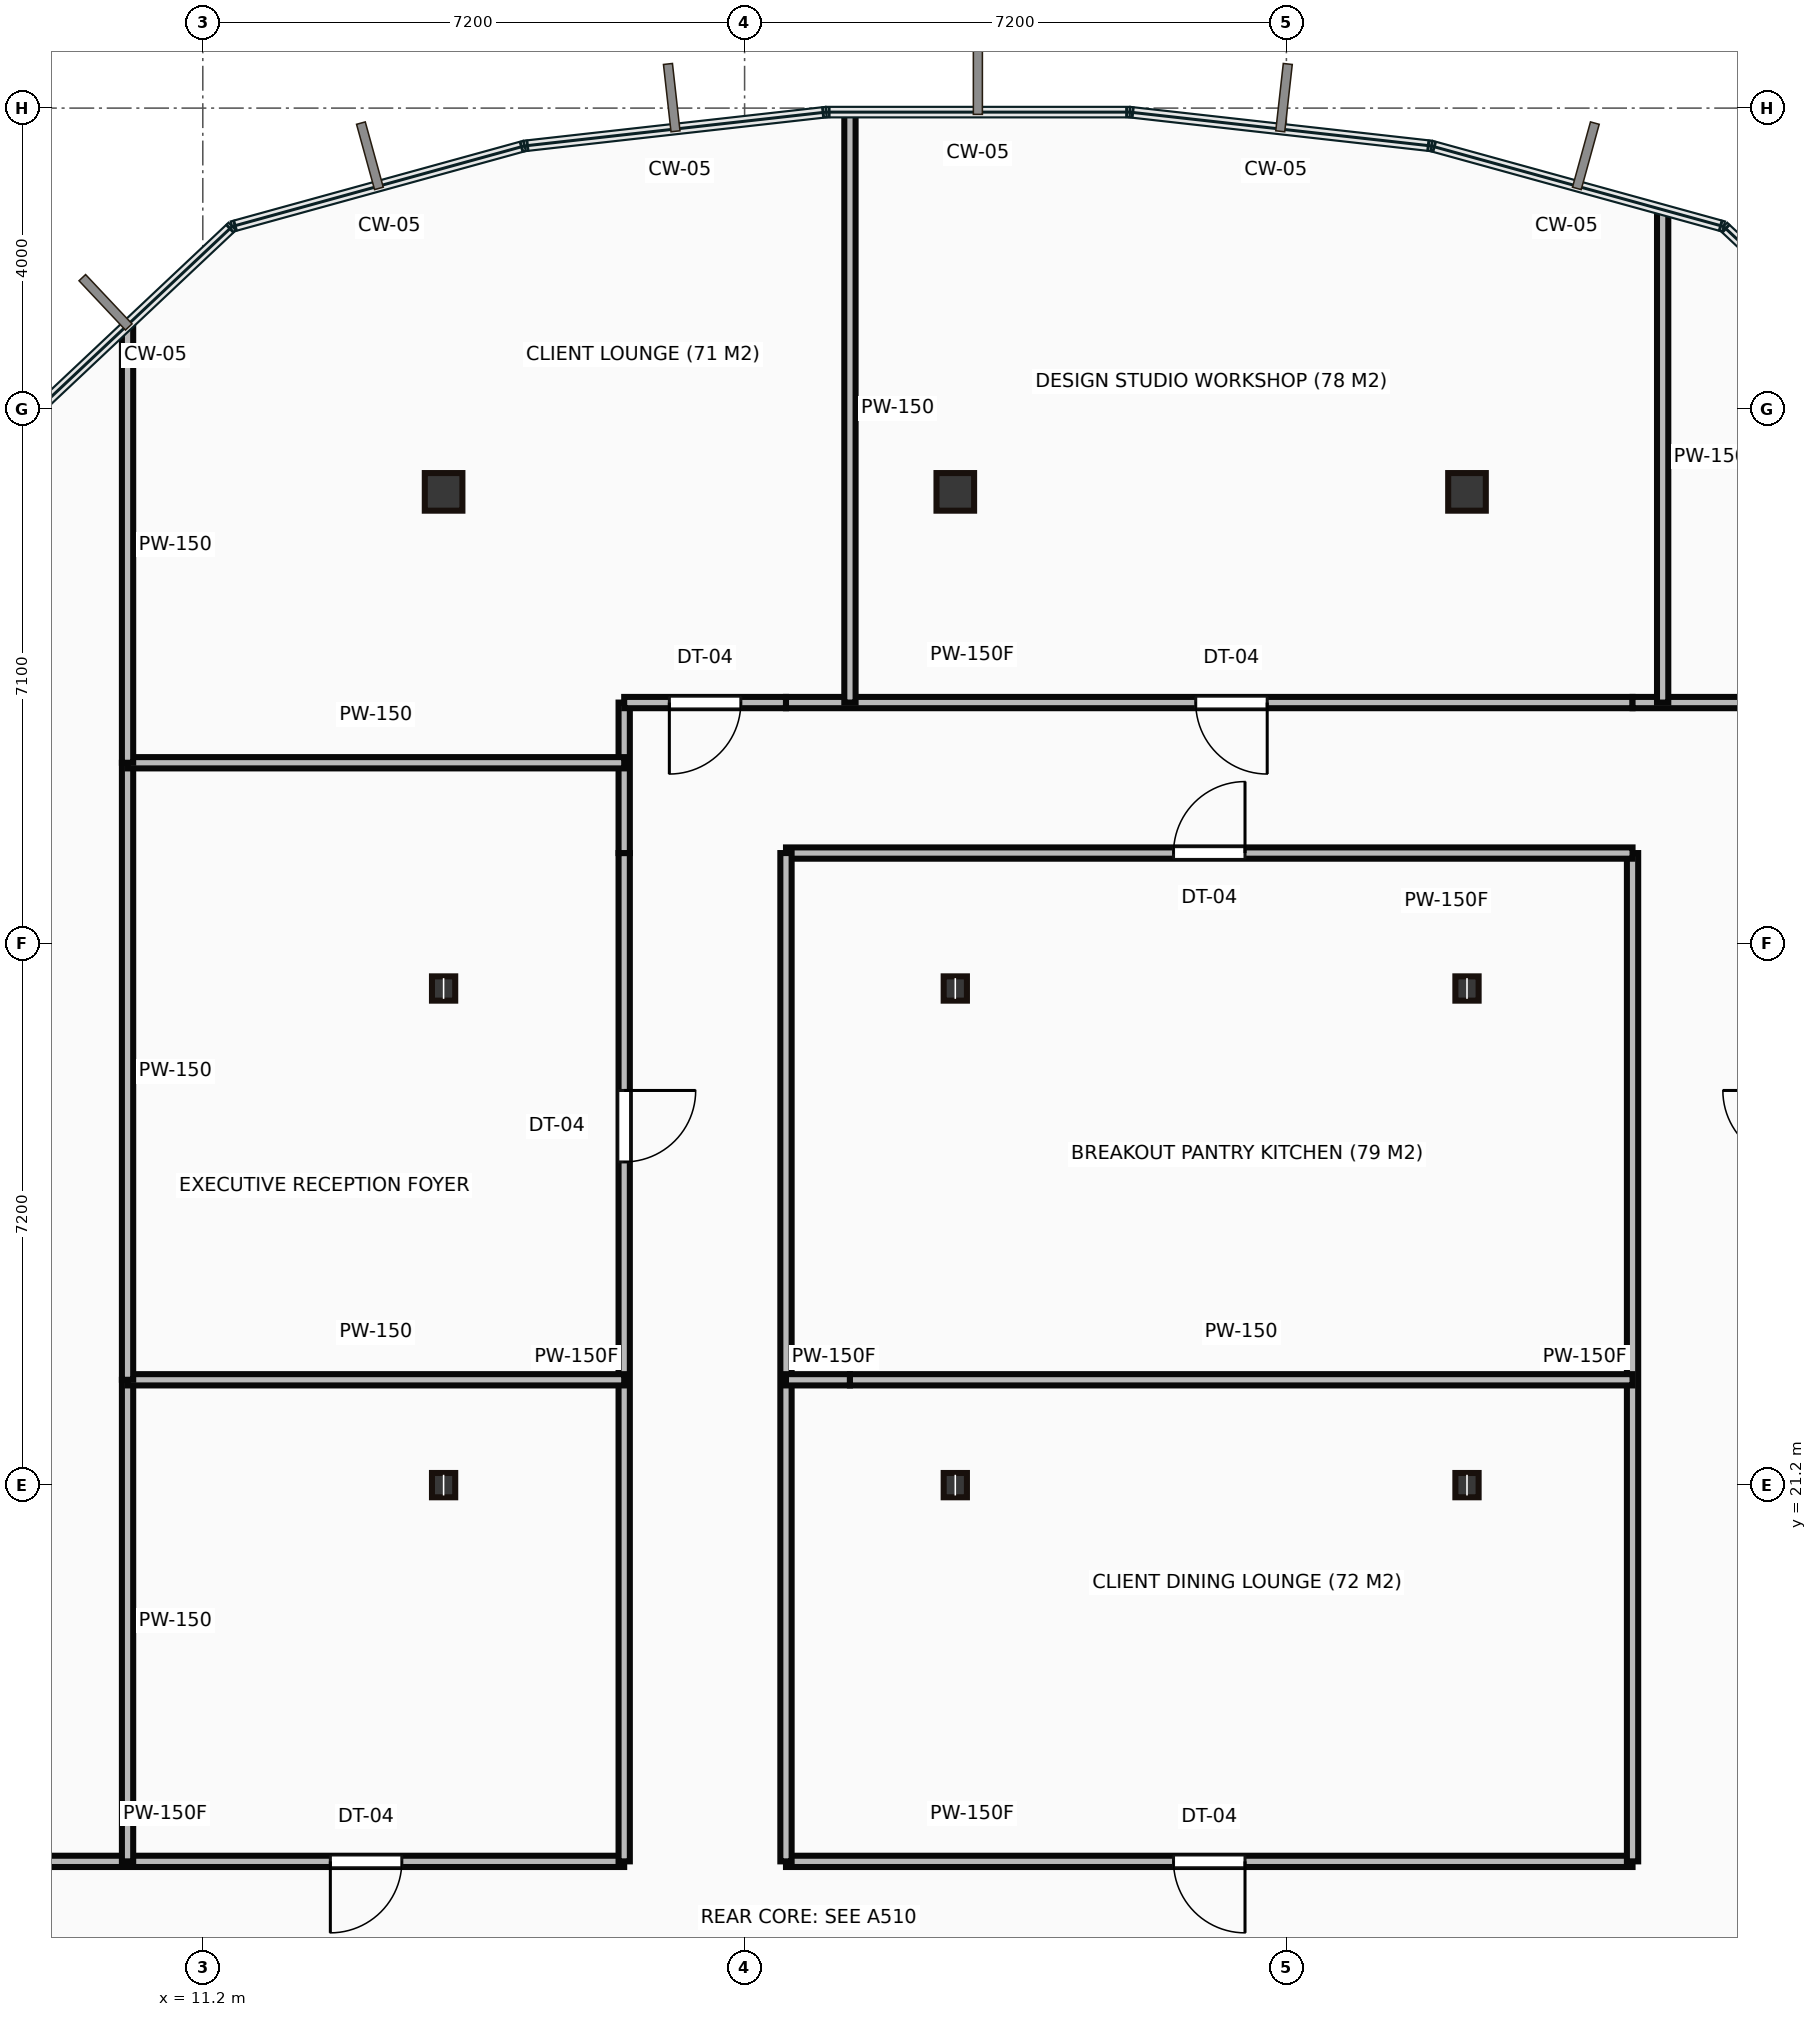
"""IFC4 building model, lengths in metres.
Left out: names, types, materials, properties, quantities, classifications, styles, units other than length and angle.
Written with IfcOpenShell. Run it as: python <this file> out.ifc"""

import sys

from ifc_helpers import new_model, si_unit, direction, frame, frame_2d, origin, origin_2d, place, context, subcontext, project, spatial, rectangle, hollow_rectangle, i_section, extrude, source, transform, mapped, element, fill, save


model = new_model("IFC4")
c1 = context("Model", 3, precision=1e-05, world=origin(), true_north=direction((0.0, 1.0)))
c2 = subcontext(c1, "Body", "Model", "MODEL_VIEW")
j1 = project(units=[si_unit("LENGTHUNIT", "METRE"), si_unit("PLANEANGLEUNIT", "RADIAN")], contexts=[c1])
p1 = place(None, origin())
s1 = spatial("IfcSite", under=j1, at=p1, CompositionType="ELEMENT")
p2 = place(p1, origin())
s2 = spatial("IfcBuilding", under=s1, at=p2, CompositionType="ELEMENT")
p3 = place(p2, frame((0.0, 0.0, 247.85)))
s3 = spatial("IfcBuildingStorey", under=s2, at=p3, CompositionType="ELEMENT", Elevation=247.85)
m1 = source(origin(), c2, "Body", "SweptSolid", [
    extrude(i_section(OverallWidth=0.309, OverallDepth=0.323, WebThickness=0.014, FlangeThickness=0.023, at=origin_2d()), origin(), (0.0, 0.0, 1.0), 3.65),
])
for number, where, z_axis, x_axis in (
    (1, (14.4, 21.2, 0.0), (0.0, 0.0, 1.0), (1.0, 0.0, 0.0)),
    (2, (14.4, 27.8, 0.0), (0.0, 0.0, 1.0), (1.0, 0.0, 0.0)),
):
    element("IfcColumn", number, at=place(p3, frame(where, z_axis=z_axis, x_axis=x_axis)), inside=s3, PredefinedType="COLUMN", context=c2, shape_type="MappedRepresentation", body=[
        mapped(m1, transform((0.0, 0.0, 0.0))),
    ])
m2 = source(origin(), c2, "Body", "SweptSolid", [
    extrude(hollow_rectangle(XDim=0.5, YDim=0.5, WallThickness=0.022, at=origin_2d()), origin(), (0.0, 0.0, 1.0), 3.65),
])
p4 = place(p3, frame((14.4, 34.4, 0.0), z_axis=(0.0, 0.0, 1.0), x_axis=(1.0, 0.0, 0.0)))
e3 = element("IfcColumn", 3, at=p4, inside=s3, PredefinedType="COLUMN", context=c2, shape_type="MappedRepresentation", body=[
    mapped(m2, transform((0.0, 0.0, 0.0))),
])
for number, where, z_axis, x_axis in (
    (4, (21.2, 21.2, 0.0), (0.0, 0.0, 1.0), (1.0, 0.0, 0.0)),
    (5, (21.2, 27.8, 0.0), (0.0, 0.0, 1.0), (1.0, 0.0, 0.0)),
):
    element("IfcColumn", number, at=place(p3, frame(where, z_axis=z_axis, x_axis=x_axis)), inside=s3, PredefinedType="COLUMN", context=c2, shape_type="MappedRepresentation", body=[
        mapped(m1, transform((0.0, 0.0, 0.0))),
    ])
p5 = place(p3, frame((21.2, 34.4, 0.0), z_axis=(0.0, 0.0, 1.0), x_axis=(1.0, 0.0, 0.0)))
e6 = element("IfcColumn", 6, at=p5, inside=s3, PredefinedType="COLUMN", context=c2, shape_type="MappedRepresentation", body=[
    mapped(m2, transform((0.0, 0.0, 0.0))),
])
for number, where, z_axis, x_axis in (
    (7, (28.0, 21.2, 0.0), (0.0, 0.0, 1.0), (1.0, 0.0, 0.0)),
    (8, (28.0, 27.8, 0.0), (0.0, 0.0, 1.0), (1.0, 0.0, 0.0)),
):
    element("IfcColumn", number, at=place(p3, frame(where, z_axis=z_axis, x_axis=x_axis)), inside=s3, PredefinedType="COLUMN", context=c2, shape_type="MappedRepresentation", body=[
        mapped(m1, transform((0.0, 0.0, 0.0))),
    ])
p6 = place(p3, frame((28.0, 34.4, 0.0), z_axis=(0.0, 0.0, 1.0), x_axis=(1.0, 0.0, 0.0)))
e9 = element("IfcColumn", 9, at=p6, inside=s3, PredefinedType="COLUMN", context=c2, shape_type="MappedRepresentation", body=[
    mapped(m2, transform((0.0, 0.0, 0.0))),
])
m3 = source(origin(), c2, "Body", "SweptSolid", [
    extrude(rectangle(XDim=12.2, YDim=0.15, at=frame_2d((6.1, 0.0))), origin(), (0.0, 0.0, 1.0), 3.4),
])
p7 = place(p3, frame((4.6, 16.2, 0.0), z_axis=(0.0, 0.0, 1.0), x_axis=(1.0, 0.0, 0.0)))
e10 = element("IfcWall", 10, at=p7, inside=s3, PredefinedType="PARTITIONING", context=c2, shape_type="MappedRepresentation", body=[
    mapped(m3, transform((0.0, 0.0, 0.0))),
])
p8 = place(p7, frame((2.455, 0.0, 0.0)))
e11 = element("IfcOpeningElement", 11, at=p8, cuts=e10, PredefinedType="OPENING", context=c2, shape_type="SweptSolid", body=[
    extrude(rectangle(XDim=0.95, YDim=2.15, at=frame_2d((0.475, 1.075))), frame((0.0, 0.085, 0.0), z_axis=(0.0, -1.0, 0.0), x_axis=(1.0, 0.0, 0.0)), (0.0, 0.0, 1.0), 0.17),
])
p9 = place(p7, frame((8.295, 0.0, 0.0)))
e12 = element("IfcOpeningElement", 12, at=p9, cuts=e10, PredefinedType="OPENING", context=c2, shape_type="SweptSolid", body=[
    extrude(rectangle(XDim=0.95, YDim=2.15, at=frame_2d((0.475, 1.075))), frame((0.0, 0.085, 0.0), z_axis=(0.0, -1.0, 0.0), x_axis=(1.0, 0.0, 0.0)), (0.0, 0.0, 1.0), 0.17),
])
m4 = source(origin(), c2, "Body", "SweptSolid", [
    extrude(rectangle(XDim=13.4, YDim=0.15, at=frame_2d((6.7, 0.0))), origin(), (0.0, 0.0, 1.0), 3.4),
])
p10 = place(p3, frame((16.8, 16.2, 0.0), z_axis=(0.0, 0.0, 1.0), x_axis=(0.0, 1.0, 0.0)))
e13 = element("IfcWall", 13, at=p10, inside=s3, PredefinedType="PARTITIONING", context=c2, shape_type="MappedRepresentation", body=[
    mapped(m4, transform((0.0, 0.0, 0.0))),
])
p11 = place(p10, frame((9.295, 0.0, 0.0)))
e14 = element("IfcOpeningElement", 14, at=p11, cuts=e13, PredefinedType="OPENING", context=c2, shape_type="SweptSolid", body=[
    extrude(rectangle(XDim=0.95, YDim=2.15, at=frame_2d((0.475, 1.075))), frame((0.0, 0.085, 0.0), z_axis=(0.0, -1.0, 0.0), x_axis=(1.0, 0.0, 0.0)), (0.0, 0.0, 1.0), 0.17),
])
m5 = source(origin(), c2, "Body", "SweptSolid", [
    extrude(rectangle(XDim=2.0, YDim=0.15, at=frame_2d((1.0, 0.0))), origin(), (0.0, 0.0, 1.0), 3.4),
])
p12 = place(p3, frame((16.8, 29.6, 0.0), z_axis=(0.0, 0.0, 1.0), x_axis=(0.0, 1.0, 0.0)))
e15 = element("IfcWall", 15, at=p12, inside=s3, PredefinedType="PARTITIONING", context=c2, shape_type="MappedRepresentation", body=[
    mapped(m5, transform((0.0, 0.0, 0.0))),
])
m6 = source(origin(), c2, "Body", "SweptSolid", [
    extrude(rectangle(XDim=2.15, YDim=0.15, at=frame_2d((1.075, 0.0))), origin(), (0.0, 0.0, 1.0), 3.4),
])
p13 = place(p3, frame((16.8, 31.6, 0.0), z_axis=(0.0, 0.0, 1.0), x_axis=(1.0, 0.0, 0.0)))
e16 = element("IfcWall", 16, at=p13, inside=s3, PredefinedType="PARTITIONING", context=c2, shape_type="MappedRepresentation", body=[
    mapped(m6, transform((0.0, 0.0, 0.0))),
])
p14 = place(p13, frame((0.6, 0.0, 0.0)))
e17 = element("IfcOpeningElement", 17, at=p14, cuts=e16, PredefinedType="OPENING", context=c2, shape_type="SweptSolid", body=[
    extrude(rectangle(XDim=0.95, YDim=2.15, at=frame_2d((0.475, 1.075))), frame((0.0, 0.085, 0.0), z_axis=(0.0, -1.0, 0.0), x_axis=(1.0, 0.0, 0.0)), (0.0, 0.0, 1.0), 0.17),
])
m7 = source(origin(), c2, "Body", "SweptSolid", [
    extrude(rectangle(XDim=11.25, YDim=0.15, at=frame_2d((5.625, 0.0))), origin(), (0.0, 0.0, 1.0), 3.4),
])
p15 = place(p3, frame((18.95, 31.6, 0.0), z_axis=(0.0, 0.0, 1.0), x_axis=(1.0, 0.0, 0.0)))
e18 = element("IfcWall", 18, at=p15, inside=s3, PredefinedType="PARTITIONING", context=c2, shape_type="MappedRepresentation", body=[
    mapped(m7, transform((0.0, 0.0, 0.0))),
])
p16 = place(p15, frame((5.445, 0.0, 0.0)))
e19 = element("IfcOpeningElement", 19, at=p16, cuts=e18, PredefinedType="OPENING", context=c2, shape_type="SweptSolid", body=[
    extrude(rectangle(XDim=0.95, YDim=2.15, at=frame_2d((0.475, 1.075))), frame((0.0, 0.085, 0.0), z_axis=(0.0, -1.0, 0.0), x_axis=(1.0, 0.0, 0.0)), (0.0, 0.0, 1.0), 0.17),
])
m8 = source(origin(), c2, "Body", "SweptSolid", [
    extrude(rectangle(XDim=2.15, YDim=0.15, at=frame_2d((1.075, 0.0))), origin(), (0.0, 0.0, 1.0), 3.4),
])
p17 = place(p3, frame((30.2, 31.6, 0.0), z_axis=(0.0, 0.0, 1.0), x_axis=(1.0, 0.0, 0.0)))
e20 = element("IfcWall", 20, at=p17, inside=s3, PredefinedType="PARTITIONING", context=c2, shape_type="MappedRepresentation", body=[
    mapped(m8, transform((0.0, 0.0, 0.0))),
])
p18 = place(p3, frame((18.95, 16.2, 0.0), z_axis=(0.0, 0.0, 1.0), x_axis=(1.0, 0.0, 0.0)))
e21 = element("IfcWall", 21, at=p18, inside=s3, PredefinedType="PARTITIONING", context=c2, shape_type="MappedRepresentation", body=[
    mapped(m7, transform((0.0, 0.0, 0.0))),
])
p19 = place(p18, frame((5.15, 0.0, 0.0)))
e22 = element("IfcOpeningElement", 22, at=p19, cuts=e21, PredefinedType="OPENING", context=c2, shape_type="SweptSolid", body=[
    extrude(rectangle(XDim=0.95, YDim=2.15, at=frame_2d((0.475, 1.075))), frame((0.0, 0.085, 0.0), z_axis=(0.0, -1.0, 0.0), x_axis=(1.0, 0.0, 0.0)), (0.0, 0.0, 1.0), 0.17),
])
p20 = place(p3, frame((30.2, 16.2, 0.0), z_axis=(0.0, 0.0, 1.0), x_axis=(0.0, 1.0, 0.0)))
e23 = element("IfcWall", 23, at=p20, inside=s3, PredefinedType="PARTITIONING", context=c2, shape_type="MappedRepresentation", body=[
    mapped(m4, transform((0.0, 0.0, 0.0))),
])
p21 = place(p3, frame((30.2, 29.6, 0.0), z_axis=(0.0, 0.0, 1.0), x_axis=(-1.0, 0.0, 0.0)))
e24 = element("IfcWall", 24, at=p21, inside=s3, PredefinedType="PARTITIONING", context=c2, shape_type="MappedRepresentation", body=[
    mapped(m7, transform((0.0, 0.0, 0.0))),
])
p22 = place(p21, frame((5.15, 0.0, 0.0)))
e25 = element("IfcOpeningElement", 25, at=p22, cuts=e24, PredefinedType="OPENING", context=c2, shape_type="SweptSolid", body=[
    extrude(rectangle(XDim=0.95, YDim=2.15, at=frame_2d((0.475, 1.075))), frame((0.0, 0.085, 0.0), z_axis=(0.0, -1.0, 0.0), x_axis=(1.0, 0.0, 0.0)), (0.0, 0.0, 1.0), 0.17),
])
p23 = place(p3, frame((18.95, 29.6, 0.0), z_axis=(0.0, 0.0, 1.0), x_axis=(0.0, -1.0, 0.0)))
e26 = element("IfcWall", 26, at=p23, inside=s3, PredefinedType="PARTITIONING", context=c2, shape_type="MappedRepresentation", body=[
    mapped(m4, transform((0.0, 0.0, 0.0))),
])
m9 = source(origin(), c2, "Body", "SweptSolid", [
    extrude(rectangle(XDim=6.4, YDim=0.15, at=frame_2d((3.2, 0.0))), origin(), (0.0, 0.0, 1.0), 3.4),
])
p24 = place(p3, frame((10.2, 22.6, 0.0), z_axis=(0.0, 0.0, 1.0), x_axis=(0.0, -1.0, 0.0)))
e27 = element("IfcWall", 27, at=p24, inside=s3, PredefinedType="PARTITIONING", context=c2, shape_type="MappedRepresentation", body=[
    mapped(m9, transform((0.0, 0.0, 0.0))),
])
m10 = source(origin(), c2, "Body", "SweptSolid", [
    extrude(rectangle(XDim=6.6, YDim=0.15, at=frame_2d((3.3, 0.0))), origin(), (0.0, 0.0, 1.0), 3.4),
])
p25 = place(p3, frame((10.2, 22.6, 0.0), z_axis=(0.0, 0.0, 1.0), x_axis=(1.0, 0.0, 0.0)))
e28 = element("IfcWall", 28, at=p25, inside=s3, PredefinedType="PARTITIONING", context=c2, shape_type="MappedRepresentation", body=[
    mapped(m10, transform((0.0, 0.0, 0.0))),
])
m11 = source(origin(), c2, "Body", "SweptSolid", [
    extrude(rectangle(XDim=8.2, YDim=0.15, at=frame_2d((4.1, 0.0))), origin(), (0.0, 0.0, 1.0), 3.4),
])
p26 = place(p3, frame((10.2, 30.8, 0.0), z_axis=(0.0, 0.0, 1.0), x_axis=(0.0, -1.0, 0.0)))
e29 = element("IfcWall", 29, at=p26, inside=s3, PredefinedType="PARTITIONING", context=c2, shape_type="MappedRepresentation", body=[
    mapped(m11, transform((0.0, 0.0, 0.0))),
])
p27 = place(p3, frame((10.2, 30.8, 0.0), z_axis=(0.0, 0.0, 1.0), x_axis=(1.0, 0.0, 0.0)))
e30 = element("IfcWall", 30, at=p27, inside=s3, PredefinedType="PARTITIONING", context=c2, shape_type="MappedRepresentation", body=[
    mapped(m10, transform((0.0, 0.0, 0.0))),
])
m12 = source(origin(), c2, "Body", "SweptSolid", [
    extrude(rectangle(XDim=5.79, YDim=0.15, at=frame_2d((2.895, 0.0))), origin(), (0.0, 0.0, 1.0), 3.4),
])
p28 = place(p3, frame((10.2, 36.59, 0.0), z_axis=(0.0, 0.0, 1.0), x_axis=(0.0, -1.0, 0.0)))
e31 = element("IfcWall", 31, at=p28, inside=s3, PredefinedType="PARTITIONING", context=c2, shape_type="MappedRepresentation", body=[
    mapped(m12, transform((0.0, 0.0, 0.0))),
])
m13 = source(origin(), c2, "Body", "SweptSolid", [
    extrude(rectangle(XDim=0.85, YDim=0.15, at=frame_2d((0.425, 0.0))), origin(), (0.0, 0.0, 1.0), 3.4),
])
p29 = place(p3, frame((18.95, 22.6, 0.0), z_axis=(0.0, 0.0, 1.0), x_axis=(1.0, 0.0, 0.0)))
e32 = element("IfcWall", 32, at=p29, inside=s3, PredefinedType="PARTITIONING", context=c2, shape_type="MappedRepresentation", body=[
    mapped(m13, transform((0.0, 0.0, 0.0))),
])
m14 = source(origin(), c2, "Body", "SweptSolid", [
    extrude(rectangle(XDim=10.4, YDim=0.15, at=frame_2d((5.2, 0.0))), origin(), (0.0, 0.0, 1.0), 3.4),
])
p30 = place(p3, frame((19.8, 22.6, 0.0), z_axis=(0.0, 0.0, 1.0), x_axis=(1.0, 0.0, 0.0)))
e33 = element("IfcWall", 33, at=p30, inside=s3, PredefinedType="PARTITIONING", context=c2, shape_type="MappedRepresentation", body=[
    mapped(m14, transform((0.0, 0.0, 0.0))),
])
m15 = source(origin(), c2, "Body", "SweptSolid", [
    extrude(rectangle(XDim=7.827, YDim=0.15, at=frame_2d((3.913, 0.0))), origin(), (0.0, 0.0, 1.0), 3.4),
])
p31 = place(p3, frame((19.8, 39.427, 0.0), z_axis=(0.0, 0.0, 1.0), x_axis=(0.0, -1.0, 0.0)))
e34 = element("IfcWall", 34, at=p31, inside=s3, PredefinedType="PARTITIONING", context=c2, shape_type="MappedRepresentation", body=[
    mapped(m15, transform((0.0, 0.0, 0.0))),
])
m16 = source(origin(), c2, "Body", "SweptSolid", [
    extrude(rectangle(XDim=6.529, YDim=0.15, at=frame_2d((3.265, 0.0))), origin(), (0.0, 0.0, 1.0), 3.4),
])
p32 = place(p3, frame((30.6, 38.129, 0.0), z_axis=(0.0, 0.0, 1.0), x_axis=(0.0, -1.0, 0.0)))
e35 = element("IfcWall", 35, at=p32, inside=s3, PredefinedType="PARTITIONING", context=c2, shape_type="MappedRepresentation", body=[
    mapped(m16, transform((0.0, 0.0, 0.0))),
])
m17 = source(origin(), c2, "Body", "SweptSolid", [
    extrude(rectangle(XDim=0.95, YDim=2.15, at=frame_2d((0.475, 1.075))), frame((0.0, 0.025, 0.0), z_axis=(0.0, -1.0, 0.0), x_axis=(1.0, 0.0, 0.0)), (0.0, 0.0, 1.0), 0.05),
])
p33 = place(p9, origin())
e36 = element("IfcDoor", 36, at=p33, inside=s3, OperationType="SINGLE_SWING_LEFT", PredefinedType="DOOR", context=c2, shape_type="MappedRepresentation", body=[
    mapped(m17, transform((0.0, 0.0, 0.0))),
])
fill(e12, e36)
p34 = place(p11, origin())
e37 = element("IfcDoor", 37, at=p34, inside=s3, OperationType="SINGLE_SWING_RIGHT", PredefinedType="DOOR", context=c2, shape_type="MappedRepresentation", body=[
    mapped(m17, transform((0.0, 0.0, 0.0))),
])
fill(e14, e37)
p35 = place(p14, origin())
e38 = element("IfcDoor", 38, at=p35, inside=s3, OperationType="SINGLE_SWING_LEFT", PredefinedType="DOOR", context=c2, shape_type="MappedRepresentation", body=[
    mapped(m17, transform((0.0, 0.0, 0.0))),
])
fill(e17, e38)
p36 = place(p19, origin())
e39 = element("IfcDoor", 39, at=p36, inside=s3, OperationType="SINGLE_SWING_RIGHT", PredefinedType="DOOR", context=c2, shape_type="MappedRepresentation", body=[
    mapped(m17, transform((0.0, 0.0, 0.0))),
])
fill(e22, e39)
p37 = place(p22, origin())
e40 = element("IfcDoor", 40, at=p37, inside=s3, OperationType="SINGLE_SWING_LEFT", PredefinedType="DOOR", context=c2, shape_type="MappedRepresentation", body=[
    mapped(m17, transform((0.0, 0.0, 0.0))),
])
fill(e25, e40)
p38 = place(p16, origin())
e41 = element("IfcDoor", 41, at=p38, inside=s3, OperationType="SINGLE_SWING_RIGHT", PredefinedType="DOOR", context=c2, shape_type="MappedRepresentation", body=[
    mapped(m17, transform((0.0, 0.0, 0.0))),
])
fill(e19, e41)
save(model, sys.argv[1])
